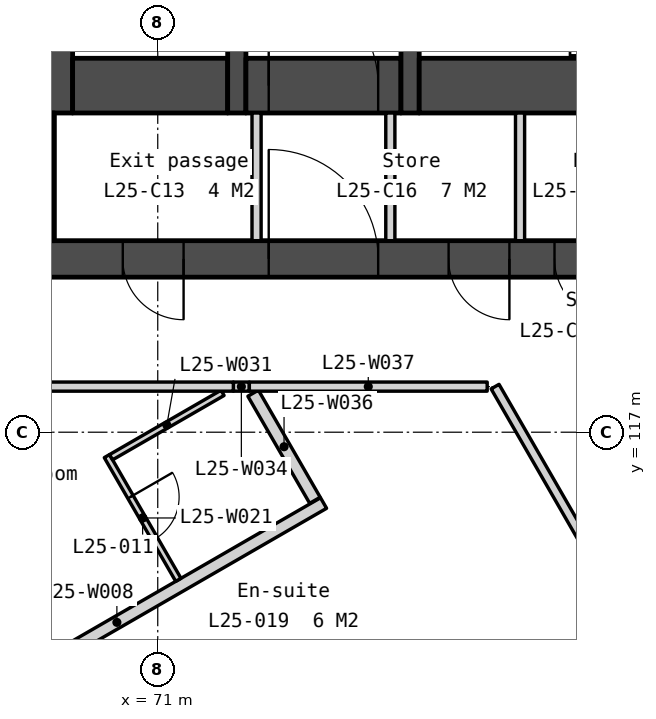
"""IFC4 building model, lengths in metres.
Left out: names, types, materials, properties, quantities, classifications, styles, units other than length and angle.
Written with IfcOpenShell. Run it as: python <this file> out.ifc"""

import sys

from ifc_helpers import new_model, si_unit, direction, frame, frame_2d, origin, place, context, subcontext, project, spatial, rectangle, extrude, element, fill, save


model = new_model("IFC4")
c1 = context("Model", 3, precision=1e-05, world=origin(), true_north=direction((0.0, 1.0)))
c2 = subcontext(c1, "Body", "Model", "MODEL_VIEW")
j1 = project(units=[si_unit("LENGTHUNIT", "METRE"), si_unit("PLANEANGLEUNIT", "RADIAN")], contexts=[c1])
p1 = place(None, origin())
s1 = spatial("IfcSite", under=j1, at=p1, CompositionType="ELEMENT")
p2 = place(p1, origin())
s2 = spatial("IfcBuilding", under=s1, at=p2, CompositionType="ELEMENT")
p3 = place(p2, frame((0.0, 0.0, 102.8)))
s3 = spatial("IfcBuildingStorey", under=s2, at=p3, CompositionType="ELEMENT", Elevation=102.8)
p4 = place(p3, frame((66.0, 119.85, 0.0), z_axis=(0.0, 0.0, 1.0), x_axis=(1.0, 0.0, 0.0)))
e1 = element("IfcWall", 1, at=p4, inside=s3, PredefinedType="SOLIDWALL", context=c2, shape_type="SweptSolid", body=[
    extrude(rectangle(XDim=28.0, YDim=0.6, at=frame_2d((14.0, 0.0))), origin(), (0.0, 0.0, 1.0), 3.35),
])
p5 = place(p4, frame((6.825, 0.0, 0.0)))
e2 = element("IfcOpeningElement", 2, at=p5, cuts=e1, PredefinedType="OPENING", context=c2, shape_type="SweptSolid", body=[
    extrude(rectangle(XDim=1.8, YDim=2.1, at=frame_2d((0.9, 1.05))), frame((0.0, 0.31, 0.0), z_axis=(0.0, -1.0, 0.0), x_axis=(1.0, 0.0, 0.0)), (0.0, 0.0, 1.0), 0.62),
])
p6 = place(p4, frame((15.85, 0.0, 0.0)))
e3 = element("IfcOpeningElement", 3, at=p6, cuts=e1, PredefinedType="OPENING", context=c2, shape_type="SweptSolid", body=[
    extrude(rectangle(XDim=1.5, YDim=2.1, at=frame_2d((0.75, 1.05))), frame((0.0, 0.31, 0.0), z_axis=(0.0, -1.0, 0.0), x_axis=(1.0, 0.0, 0.0)), (0.0, 0.0, 1.0), 0.62),
])
p7 = place(p4, frame((19.375, 0.0, 0.0)))
e4 = element("IfcOpeningElement", 4, at=p7, cuts=e1, PredefinedType="OPENING", context=c2, shape_type="SweptSolid", body=[
    extrude(rectangle(XDim=1.8, YDim=2.1, at=frame_2d((0.9, 1.05))), frame((0.0, 0.31, 0.0), z_axis=(0.0, -1.0, 0.0), x_axis=(1.0, 0.0, 0.0)), (0.0, 0.0, 1.0), 0.62),
])
p8 = place(p4, frame((4.425, 0.0, 0.0)))
e5 = element("IfcOpeningElement", 5, at=p8, cuts=e1, PredefinedType="OPENING", context=c2, shape_type="SweptSolid", body=[
    extrude(rectangle(XDim=1.0, YDim=2.1, at=frame_2d((0.5, 1.05))), frame((0.0, 0.31, 0.0), z_axis=(0.0, -1.0, 0.0), x_axis=(1.0, 0.0, 0.0)), (0.0, 0.0, 1.0), 0.62),
])
p9 = place(p4, frame((9.783, 0.0, 0.0)))
e6 = element("IfcOpeningElement", 6, at=p9, cuts=e1, PredefinedType="OPENING", context=c2, shape_type="SweptSolid", body=[
    extrude(rectangle(XDim=1.0, YDim=2.1, at=frame_2d((0.5, 1.05))), frame((0.0, 0.31, 0.0), z_axis=(0.0, -1.0, 0.0), x_axis=(1.0, 0.0, 0.0)), (0.0, 0.0, 1.0), 0.62),
])
p10 = place(p4, frame((11.525, 0.0, 0.0)))
e7 = element("IfcOpeningElement", 7, at=p10, cuts=e1, PredefinedType="OPENING", context=c2, shape_type="SweptSolid", body=[
    extrude(rectangle(XDim=1.0, YDim=2.1, at=frame_2d((0.5, 1.05))), frame((0.0, 0.31, 0.0), z_axis=(0.0, -1.0, 0.0), x_axis=(1.0, 0.0, 0.0)), (0.0, 0.0, 1.0), 0.62),
])
p11 = place(p4, frame((13.658, 0.0, 0.0)))
e8 = element("IfcOpeningElement", 8, at=p11, cuts=e1, PredefinedType="OPENING", context=c2, shape_type="SweptSolid", body=[
    extrude(rectangle(XDim=1.0, YDim=2.1, at=frame_2d((0.5, 1.05))), frame((0.0, 0.31, 0.0), z_axis=(0.0, -1.0, 0.0), x_axis=(1.0, 0.0, 0.0)), (0.0, 0.0, 1.0), 0.62),
])
p12 = place(p4, frame((22.575, 0.0, 0.0)))
e9 = element("IfcOpeningElement", 9, at=p12, cuts=e1, PredefinedType="OPENING", context=c2, shape_type="SweptSolid", body=[
    extrude(rectangle(XDim=1.0, YDim=2.1, at=frame_2d((0.5, 1.05))), frame((0.0, 0.31, 0.0), z_axis=(0.0, -1.0, 0.0), x_axis=(1.0, 0.0, 0.0)), (0.0, 0.0, 1.0), 0.62),
])
p13 = place(p3, frame((69.15, 133.95, 0.0), z_axis=(0.0, 0.0, 1.0), x_axis=(0.0, -1.0, 0.0)))
e10 = element("IfcWall", 10, at=p13, inside=s3, PredefinedType="SOLIDWALL", context=c2, shape_type="SweptSolid", body=[
    extrude(rectangle(XDim=11.7, YDim=0.9, at=frame_2d((5.85, 0.0))), origin(), (0.0, 0.0, 1.0), 3.35),
])
p14 = place(p3, frame((69.0, 122.25, 0.0), z_axis=(0.0, 0.0, 1.0), x_axis=(0.0, -1.0, 0.0)))
e11 = element("IfcWall", 11, at=p14, inside=s3, PredefinedType="SOLIDWALL", context=c2, shape_type="SweptSolid", body=[
    extrude(rectangle(XDim=2.1, YDim=0.6, at=frame_2d((1.05, 0.0))), origin(), (0.0, 0.0, 1.0), 3.35),
])
p15 = place(p3, frame((69.6, 122.7, 0.0), z_axis=(0.0, 0.0, 1.0), x_axis=(1.0, 0.0, 0.0)))
e12 = element("IfcWall", 12, at=p15, inside=s3, PredefinedType="SOLIDWALL", context=c2, shape_type="SweptSolid", body=[
    extrude(rectangle(XDim=2.55, YDim=0.9, at=frame_2d((1.275, 0.0))), origin(), (0.0, 0.0, 1.0), 3.35),
])
p16 = place(p3, frame((72.3, 133.95, 0.0), z_axis=(0.0, 0.0, 1.0), x_axis=(0.0, -1.0, 0.0)))
e13 = element("IfcWall", 13, at=p16, inside=s3, PredefinedType="SOLIDWALL", context=c2, shape_type="SweptSolid", body=[
    extrude(rectangle(XDim=11.7, YDim=0.3, at=frame_2d((5.85, 0.0))), origin(), (0.0, 0.0, 1.0), 3.35),
])
p17 = place(p16, frame((6.95, 0.0, 0.0)))
e14 = element("IfcOpeningElement", 14, at=p17, cuts=e13, PredefinedType="OPENING", context=c2, shape_type="SweptSolid", body=[
    extrude(rectangle(XDim=1.1, YDim=2.1, at=frame_2d((0.55, 1.05))), frame((0.0, 0.16, 0.0), z_axis=(0.0, -1.0, 0.0), x_axis=(1.0, 0.0, 0.0)), (0.0, 0.0, 1.0), 0.32),
])
p18 = place(p16, frame((9.35, 0.0, 0.0)))
e15 = element("IfcOpeningElement", 15, at=p18, cuts=e13, PredefinedType="OPENING", context=c2, shape_type="SweptSolid", body=[
    extrude(rectangle(XDim=0.9, YDim=2.1, at=frame_2d((0.45, 1.05))), frame((0.0, 0.16, 0.0), z_axis=(0.0, -1.0, 0.0), x_axis=(1.0, 0.0, 0.0)), (0.0, 0.0, 1.0), 0.32),
])
p19 = place(p16, frame((5.1, 0.0, 0.0)))
e16 = element("IfcOpeningElement", 16, at=p19, cuts=e13, PredefinedType="OPENING", context=c2, shape_type="SweptSolid", body=[
    extrude(rectangle(XDim=1.0, YDim=2.1, at=frame_2d((0.5, 1.05))), frame((0.0, 0.16, 0.0), z_axis=(0.0, -1.0, 0.0), x_axis=(1.0, 0.0, 0.0)), (0.0, 0.0, 1.0), 0.32),
])
p20 = place(p3, frame((72.45, 122.7, 0.0), z_axis=(0.0, 0.0, 1.0), x_axis=(1.0, 0.0, 0.0)))
e17 = element("IfcWall", 17, at=p20, inside=s3, PredefinedType="SOLIDWALL", context=c2, shape_type="SweptSolid", body=[
    extrude(rectangle(XDim=2.55, YDim=0.9, at=frame_2d((1.275, 0.0))), origin(), (0.0, 0.0, 1.0), 3.35),
])
p21 = place(p20, frame((0.375, 0.0, 0.0)))
e18 = element("IfcOpeningElement", 18, at=p21, cuts=e17, PredefinedType="OPENING", context=c2, shape_type="SweptSolid", body=[
    extrude(rectangle(XDim=1.8, YDim=2.1, at=frame_2d((0.9, 1.05))), frame((0.0, 0.46, 0.0), z_axis=(0.0, -1.0, 0.0), x_axis=(1.0, 0.0, 0.0)), (0.0, 0.0, 1.0), 0.92),
])
for number, where, z_axis, x_axis in (
    (19, (72.625, 122.25, 0.0), (0.0, 0.0, 1.0), (0.0, -1.0, 0.0)),
    (20, (74.825, 122.25, 0.0), (0.0, 0.0, 1.0), (0.0, -1.0, 0.0)),
):
    element("IfcWall", number, at=place(p3, frame(where, z_axis=z_axis, x_axis=x_axis)), inside=s3, PredefinedType="PARTITIONING", context=c2, shape_type="SweptSolid", body=[
        extrude(rectangle(XDim=2.1, YDim=0.15, at=frame_2d((1.05, 0.0))), origin(), (0.0, 0.0, 1.0), 3.35),
    ])
p22 = place(p3, frame((75.15, 133.95, 0.0), z_axis=(0.0, 0.0, 1.0), x_axis=(0.0, -1.0, 0.0)))
e21 = element("IfcWall", 21, at=p22, inside=s3, PredefinedType="SOLIDWALL", context=c2, shape_type="SweptSolid", body=[
    extrude(rectangle(XDim=11.7, YDim=0.3, at=frame_2d((5.85, 0.0))), origin(), (0.0, 0.0, 1.0), 3.35),
])
p23 = place(p3, frame((75.3, 122.7, 0.0), z_axis=(0.0, 0.0, 1.0), x_axis=(1.0, 0.0, 0.0)))
e22 = element("IfcWall", 22, at=p23, inside=s3, PredefinedType="SOLIDWALL", context=c2, shape_type="SweptSolid", body=[
    extrude(rectangle(XDim=6.2, YDim=0.9, at=frame_2d((3.1, 0.0))), origin(), (0.0, 0.0, 1.0), 3.35),
])
p24 = place(p3, frame((76.958, 122.25, 0.0), z_axis=(0.0, 0.0, 1.0), x_axis=(0.0, -1.0, 0.0)))
e23 = element("IfcWall", 23, at=p24, inside=s3, PredefinedType="PARTITIONING", context=c2, shape_type="SweptSolid", body=[
    extrude(rectangle(XDim=2.1, YDim=0.15, at=frame_2d((1.05, 0.0))), origin(), (0.0, 0.0, 1.0), 3.35),
])
p25 = place(p3, frame((76.548, 117.75, 0.0), z_axis=(0.0, 0.0, 1.0), x_axis=(0.499203981413, -0.866484497808, 0.0)))
e24 = element("IfcWall", 24, at=p25, inside=s3, PredefinedType="PARTITIONING", context=c2, shape_type="SweptSolid", body=[
    extrude(rectangle(XDim=10.832, YDim=0.15, at=frame_2d((5.416, 0.0))), origin(), (0.0, 0.0, 1.0), 3.35),
])
p26 = place(p25, frame((4.916, 0.0, 0.0)))
e25 = element("IfcOpeningElement", 25, at=p26, cuts=e24, PredefinedType="OPENING", context=c2, shape_type="SweptSolid", body=[
    extrude(rectangle(XDim=1.0, YDim=2.1, at=frame_2d((0.5, 1.05))), frame((0.0, 0.085, 0.0), z_axis=(0.0, -1.0, 0.0), x_axis=(1.0, 0.0, 0.0)), (0.0, 0.0, 1.0), 0.17),
])
p27 = place(p3, frame((66.929, 111.91, 0.0), z_axis=(0.0, 0.0, 1.0), x_axis=(0.866021914183, 0.500006044118, 0.0)))
e26 = element("IfcWall", 26, at=p27, inside=s3, PredefinedType="PARTITIONING", context=c2, shape_type="SweptSolid", body=[
    extrude(rectangle(XDim=7.85, YDim=0.2, at=frame_2d((3.925, 0.0))), origin(), (0.0, 0.0, 1.0), 3.35),
])
p28 = place(p3, frame((70.164, 116.607, 0.0), z_axis=(0.0, 0.0, 1.0), x_axis=(0.499938297808, -0.866061024631, 0.0)))
e27 = element("IfcWall", 27, at=p28, inside=s3, PredefinedType="PARTITIONING", context=c2, shape_type="SweptSolid", body=[
    extrude(rectangle(XDim=2.35, YDim=0.1, at=frame_2d((1.175, 0.0))), origin(), (0.0, 0.0, 1.0), 3.35),
])
p29 = place(p28, frame((0.775, 0.0, 0.0)))
e28 = element("IfcOpeningElement", 28, at=p29, cuts=e27, PredefinedType="OPENING", context=c2, shape_type="SweptSolid", body=[
    extrude(rectangle(XDim=0.8, YDim=2.1, at=frame_2d((0.4, 1.05))), frame((0.0, 0.06, 0.0), z_axis=(0.0, -1.0, 0.0), x_axis=(1.0, 0.0, 0.0)), (0.0, 0.0, 1.0), 0.12),
])
p30 = place(p3, frame((70.232, 116.589, 0.0), z_axis=(0.0, 0.0, 1.0), x_axis=(0.866028160477, 0.499995225238, 0.0)))
e29 = element("IfcWall", 29, at=p30, inside=s3, PredefinedType="PARTITIONING", context=c2, shape_type="SweptSolid", body=[
    extrude(rectangle(XDim=2.118, YDim=0.1, at=frame_2d((1.059, 0.0))), origin(), (0.0, 0.0, 1.0), 3.35),
])
p31 = place(p3, frame((72.244, 117.75, 0.0), z_axis=(0.0, 0.0, 1.0), x_axis=(1.0, 0.0, 0.0)))
e30 = element("IfcWall", 30, at=p31, inside=s3, PredefinedType="PARTITIONING", context=c2, shape_type="SweptSolid", body=[
    extrude(rectangle(XDim=0.263, YDim=0.15, at=frame_2d((0.131, 0.0))), origin(), (0.0, 0.0, 1.0), 3.35),
])
p32 = place(p3, frame((64.275, 117.75, 0.0), z_axis=(0.0, 0.0, 1.0), x_axis=(1.0, 0.0, 0.0)))
e31 = element("IfcWall", 31, at=p32, inside=s3, PredefinedType="PARTITIONING", context=c2, shape_type="SweptSolid", body=[
    extrude(rectangle(XDim=7.969, YDim=0.15, at=frame_2d((3.984, 0.0))), origin(), (0.0, 0.0, 1.0), 3.35),
])
p33 = place(p32, frame((3.534, 0.0, 0.0)))
e32 = element("IfcOpeningElement", 32, at=p33, cuts=e31, PredefinedType="OPENING", context=c2, shape_type="SweptSolid", body=[
    extrude(rectangle(XDim=0.9, YDim=2.1, at=frame_2d((0.45, 1.05))), frame((0.0, 0.085, 0.0), z_axis=(0.0, -1.0, 0.0), x_axis=(1.0, 0.0, 0.0)), (0.0, 0.0, 1.0), 0.17),
])
p34 = place(p3, frame((72.569, 117.642, 0.0), z_axis=(0.0, 0.0, 1.0), x_axis=(0.49976748816, -0.866159602948, 0.0)))
e33 = element("IfcWall", 33, at=p34, inside=s3, PredefinedType="PARTITIONING", context=c2, shape_type="SweptSolid", body=[
    extrude(rectangle(XDim=2.034, YDim=0.2, at=frame_2d((1.017, 0.0))), origin(), (0.0, 0.0, 1.0), 3.35),
])
p35 = place(p3, frame((72.506, 117.75, 0.0), z_axis=(0.0, 0.0, 1.0), x_axis=(1.0, 0.0, 0.0)))
e34 = element("IfcWall", 34, at=p35, inside=s3, PredefinedType="PARTITIONING", context=c2, shape_type="SweptSolid", body=[
    extrude(rectangle(XDim=3.912, YDim=0.15, at=frame_2d((1.956, 0.0))), origin(), (0.0, 0.0, 1.0), 3.35),
])
p36 = place(p21, origin())
e35 = element("IfcDoor", 35, at=p36, inside=s3, OperationType="DOUBLE_DOOR_DOUBLE_SWING", PredefinedType="DOOR", context=c2, shape_type="SweptSolid", body=[
    extrude(rectangle(XDim=1.8, YDim=2.1, at=frame_2d((0.9, 1.05))), frame((0.0, 0.025, 0.0), z_axis=(0.0, -1.0, 0.0), x_axis=(1.0, 0.0, 0.0)), (0.0, 0.0, 1.0), 0.05),
])
fill(e18, e35)
p37 = place(p5, origin())
e36 = element("IfcDoor", 36, at=p37, inside=s3, OperationType="DOUBLE_DOOR_DOUBLE_SWING", PredefinedType="DOOR", context=c2, shape_type="SweptSolid", body=[
    extrude(rectangle(XDim=1.8, YDim=2.1, at=frame_2d((0.9, 1.05))), frame((0.0, 0.025, 0.0), z_axis=(0.0, -1.0, 0.0), x_axis=(1.0, 0.0, 0.0)), (0.0, 0.0, 1.0), 0.05),
])
fill(e2, e36)
p38 = place(p8, origin())
e37 = element("IfcDoor", 37, at=p38, inside=s3, OperationType="SINGLE_SWING_RIGHT", PredefinedType="DOOR", context=c2, shape_type="SweptSolid", body=[
    extrude(rectangle(XDim=1.0, YDim=2.1, at=frame_2d((0.5, 1.05))), frame((0.0, 0.025, 0.0), z_axis=(0.0, -1.0, 0.0), x_axis=(1.0, 0.0, 0.0)), (0.0, 0.0, 1.0), 0.05),
])
fill(e5, e37)
p39 = place(p9, origin())
e38 = element("IfcDoor", 38, at=p39, inside=s3, OperationType="SINGLE_SWING_RIGHT", PredefinedType="DOOR", context=c2, shape_type="SweptSolid", body=[
    extrude(rectangle(XDim=1.0, YDim=2.1, at=frame_2d((0.5, 1.05))), frame((0.0, 0.025, 0.0), z_axis=(0.0, -1.0, 0.0), x_axis=(1.0, 0.0, 0.0)), (0.0, 0.0, 1.0), 0.05),
])
fill(e6, e38)
p40 = place(p10, origin())
e39 = element("IfcDoor", 39, at=p40, inside=s3, OperationType="SINGLE_SWING_RIGHT", PredefinedType="DOOR", context=c2, shape_type="SweptSolid", body=[
    extrude(rectangle(XDim=1.0, YDim=2.1, at=frame_2d((0.5, 1.05))), frame((0.0, 0.025, 0.0), z_axis=(0.0, -1.0, 0.0), x_axis=(1.0, 0.0, 0.0)), (0.0, 0.0, 1.0), 0.05),
])
fill(e7, e39)
p41 = place(p29, origin())
e40 = element("IfcDoor", 40, at=p41, inside=s3, OperationType="SINGLE_SWING_LEFT", PredefinedType="DOOR", context=c2, shape_type="SweptSolid", body=[
    extrude(rectangle(XDim=0.8, YDim=2.1, at=frame_2d((0.4, 1.05))), frame((0.0, 0.025, 0.0), z_axis=(0.0, -1.0, 0.0), x_axis=(1.0, 0.0, 0.0)), (0.0, 0.0, 1.0), 0.05),
])
fill(e28, e40)
save(model, sys.argv[1])
